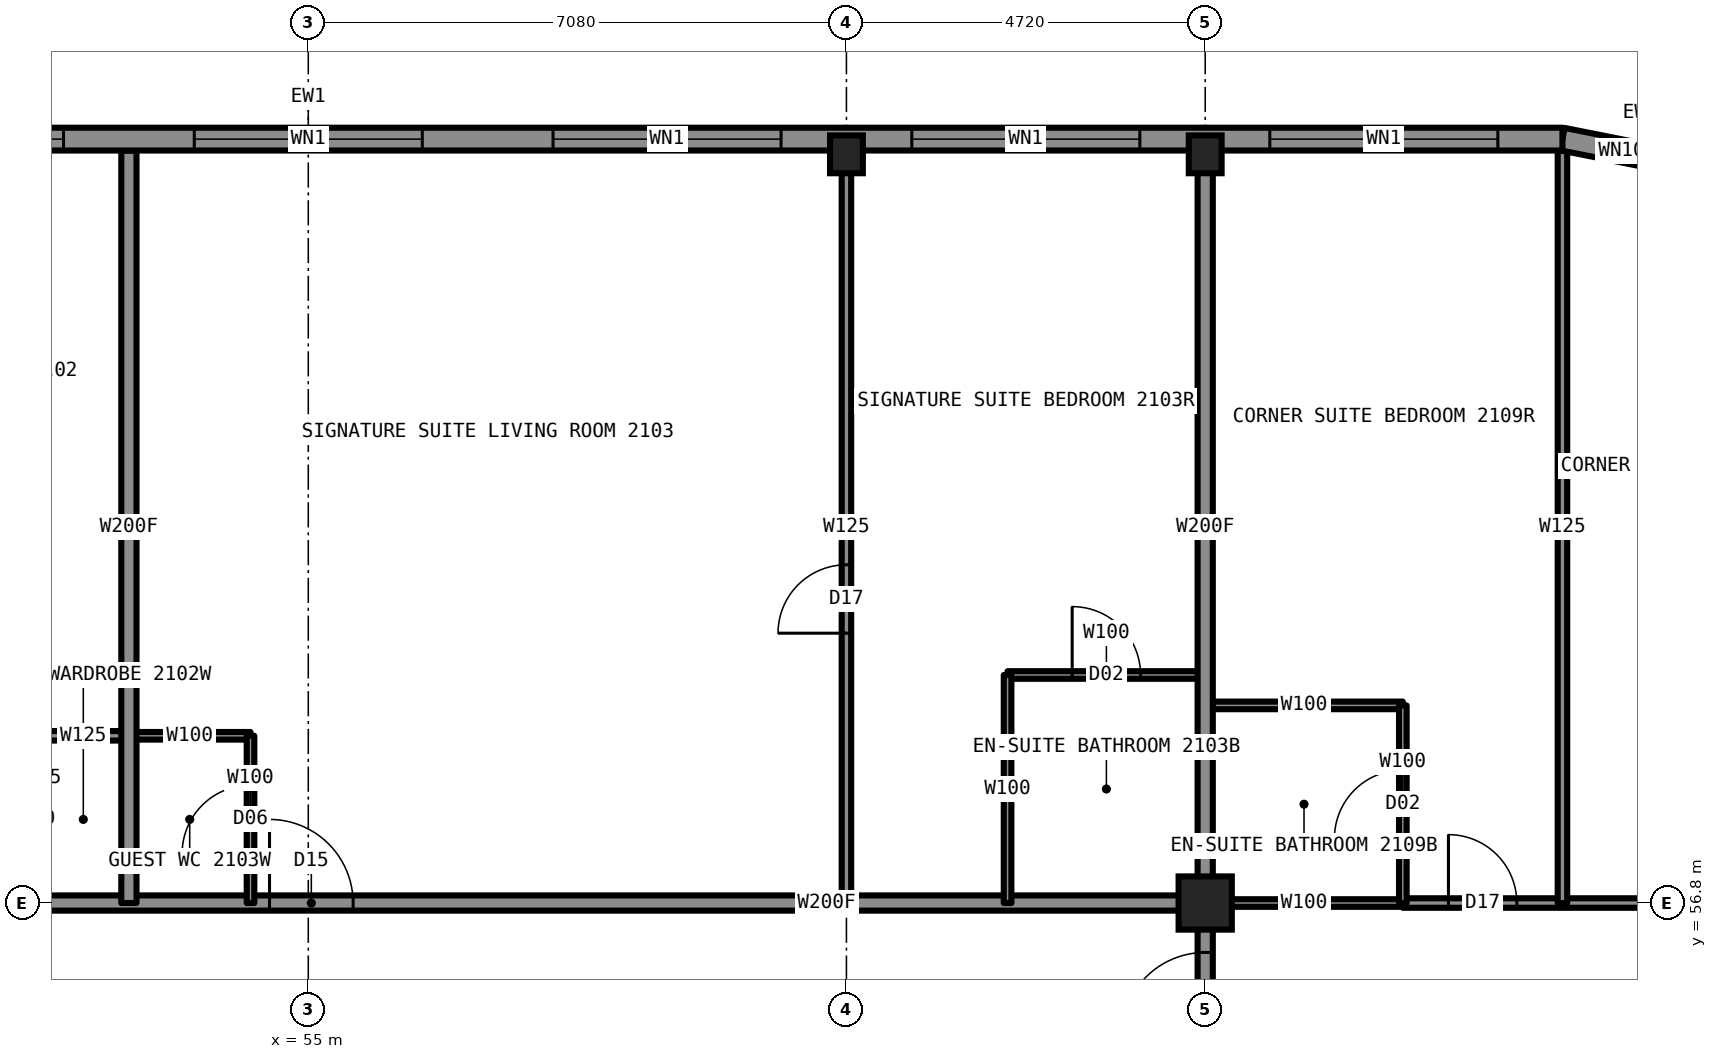
"""IFC4 building model, lengths in metres.
Left out: names, types, materials, properties, quantities, classifications, styles, units other than length and angle.
Written with IfcOpenShell. Run it as: python <this file> out.ifc"""

import sys

from ifc_helpers import new_model, si_unit, direction, frame, frame_2d, origin, origin_2d, place, context, subcontext, project, spatial, rectangle, hollow_rectangle, i_section, extrude, element, fill, save


model = new_model("IFC4")
c1 = context("Model", 3, precision=1e-05, world=origin(), true_north=direction((0.0, 1.0)))
c2 = subcontext(c1, "Body", "Model", "MODEL_VIEW")
j1 = project(units=[si_unit("LENGTHUNIT", "METRE"), si_unit("PLANEANGLEUNIT", "RADIAN")], contexts=[c1])
p1 = place(None, origin())
s1 = spatial("IfcSite", under=j1, at=p1, CompositionType="ELEMENT")
p2 = place(p1, origin())
s2 = spatial("IfcBuilding", under=s1, at=p2, CompositionType="ELEMENT")
p3 = place(p2, frame((0.0, 0.0, 81.0)))
s3 = spatial("IfcBuildingStorey", under=s2, at=p3, CompositionType="ELEMENT", Elevation=81.0)
for number, where, z_axis, x_axis in (
    (1, (62.08, 66.65, 0.0), (0.0, 0.0, 1.0), (1.0, 0.0, 0.0)),
    (2, (66.8, 66.65, 0.0), (0.0, 0.0, 1.0), (1.0, 0.0, 0.0)),
):
    element("IfcColumn", number, at=place(p3, frame(where, z_axis=z_axis, x_axis=x_axis)), inside=s3, PredefinedType="COLUMN", context=c2, shape_type="SweptSolid", body=[
        extrude(i_section(OverallWidth=0.432, OverallDepth=0.498, WebThickness=0.056, FlangeThickness=0.089, at=origin_2d()), origin(), (0.0, 0.0, 1.0), 3.5),
    ])
p4 = place(p3, frame((66.8, 56.8, 0.0), z_axis=(0.0, 0.0, 1.0), x_axis=(1.0, 0.0, 0.0)))
e3 = element("IfcColumn", 3, at=p4, inside=s3, PredefinedType="COLUMN", context=c2, shape_type="SweptSolid", body=[
    extrude(hollow_rectangle(XDim=0.7, YDim=0.7, WallThickness=0.06, at=origin_2d()), origin(), (0.0, 0.0, 1.0), 3.5),
])
p5 = place(p3, frame((66.8, 56.8, 0.0), z_axis=(0.0, 0.0, 1.0), x_axis=(1.0, 0.0, 0.0)))
e4 = element("IfcWall", 4, at=p5, inside=s3, PredefinedType="PARTITIONING", context=c2, shape_type="SweptSolid", body=[
    extrude(rectangle(XDim=2.6, YDim=0.1, at=frame_2d((1.3, 0.0))), origin(), (0.0, 0.0, 1.0), 2.573),
])
p6 = place(p3, frame((43.2, 56.8, 0.0), z_axis=(0.0, 0.0, 1.0), x_axis=(1.0, 0.0, 0.0)))
e5 = element("IfcWall", 5, at=p6, inside=s3, PredefinedType="PARTITIONING", context=c2, shape_type="SweptSolid", body=[
    extrude(rectangle(XDim=23.6, YDim=0.2, at=frame_2d((11.8, 0.0))), origin(), (0.0, 0.0, 1.0), 3.33),
])
p7 = place(p6, frame((0.7, 0.0, 0.0)))
e6 = element("IfcOpeningElement", 6, at=p7, cuts=e5, PredefinedType="OPENING", context=c2, shape_type="SweptSolid", body=[
    extrude(rectangle(XDim=1.0, YDim=2.2, at=frame_2d((0.5, 1.1))), frame((0.0, 0.11, 0.0), z_axis=(0.0, -1.0, 0.0), x_axis=(1.0, 0.0, 0.0)), (0.0, 0.0, 1.0), 0.22),
])
p8 = place(p6, frame((6.98, 0.0, 0.0)))
e7 = element("IfcOpeningElement", 7, at=p8, cuts=e5, PredefinedType="OPENING", context=c2, shape_type="SweptSolid", body=[
    extrude(rectangle(XDim=1.0, YDim=2.2, at=frame_2d((0.5, 1.1))), frame((0.0, 0.11, 0.0), z_axis=(0.0, -1.0, 0.0), x_axis=(1.0, 0.0, 0.0)), (0.0, 0.0, 1.0), 0.22),
])
p9 = place(p6, frame((11.29, 0.0, 0.0)))
e8 = element("IfcOpeningElement", 8, at=p9, cuts=e5, PredefinedType="OPENING", context=c2, shape_type="SweptSolid", body=[
    extrude(rectangle(XDim=1.1, YDim=2.2, at=frame_2d((0.55, 1.1))), frame((0.0, 0.11, 0.0), z_axis=(0.0, -1.0, 0.0), x_axis=(1.0, 0.0, 0.0)), (0.0, 0.0, 1.0), 0.22),
])
p10 = place(p3, frame((69.4, 56.8, 0.0), z_axis=(0.0, 0.0, 1.0), x_axis=(1.0, 0.0, 0.0)))
e9 = element("IfcWall", 9, at=p10, inside=s3, PredefinedType="PARTITIONING", context=c2, shape_type="SweptSolid", body=[
    extrude(rectangle(XDim=7.3, YDim=0.125, at=frame_2d((3.65, 0.0))), origin(), (0.0, 0.0, 1.0), 2.573),
])
p11 = place(p10, frame((0.6, 0.0, 0.0)))
e10 = element("IfcOpeningElement", 10, at=p11, cuts=e9, PredefinedType="OPENING", context=c2, shape_type="SweptSolid", body=[
    extrude(rectangle(XDim=0.9, YDim=2.2, at=frame_2d((0.45, 1.1))), frame((0.0, 0.073, 0.0), z_axis=(0.0, -1.0, 0.0), x_axis=(1.0, 0.0, 0.0)), (0.0, 0.0, 1.0), 0.145),
])
p12 = place(p10, frame((4.4, 0.0, 0.0)))
e11 = element("IfcOpeningElement", 11, at=p12, cuts=e9, PredefinedType="OPENING", context=c2, shape_type="SweptSolid", body=[
    extrude(rectangle(XDim=0.9, YDim=2.2, at=frame_2d((0.45, 1.1))), frame((0.0, 0.073, 0.0), z_axis=(0.0, -1.0, 0.0), x_axis=(1.0, 0.0, 0.0)), (0.0, 0.0, 1.0), 0.145),
])
p13 = place(p3, frame((52.64, 59.0, 0.0), z_axis=(0.0, 0.0, 1.0), x_axis=(1.0, 0.0, 0.0)))
e12 = element("IfcWall", 12, at=p13, inside=s3, PredefinedType="PARTITIONING", context=c2, shape_type="SweptSolid", body=[
    extrude(rectangle(XDim=1.6, YDim=0.1, at=frame_2d((0.8, 0.0))), origin(), (0.0, 0.0, 1.0), 3.33),
])
p14 = place(p3, frame((51.44, 59.0, 0.0), z_axis=(0.0, 0.0, 1.0), x_axis=(1.0, 0.0, 0.0)))
e13 = element("IfcWall", 13, at=p14, inside=s3, PredefinedType="PARTITIONING", context=c2, shape_type="SweptSolid", body=[
    extrude(rectangle(XDim=1.2, YDim=0.125, at=frame_2d((0.6, 0.0))), origin(), (0.0, 0.0, 1.0), 3.33),
])
p15 = place(p3, frame((66.8, 59.4, 0.0), z_axis=(0.0, 0.0, 1.0), x_axis=(1.0, 0.0, 0.0)))
e14 = element("IfcWall", 14, at=p15, inside=s3, PredefinedType="PARTITIONING", context=c2, shape_type="SweptSolid", body=[
    extrude(rectangle(XDim=2.6, YDim=0.1, at=frame_2d((1.3, 0.0))), origin(), (0.0, 0.0, 1.0), 3.33),
])
p16 = place(p3, frame((64.2, 59.8, 0.0), z_axis=(0.0, 0.0, 1.0), x_axis=(1.0, 0.0, 0.0)))
e15 = element("IfcWall", 15, at=p16, inside=s3, PredefinedType="PARTITIONING", context=c2, shape_type="SweptSolid", body=[
    extrude(rectangle(XDim=2.6, YDim=0.1, at=frame_2d((1.3, 0.0))), origin(), (0.0, 0.0, 1.0), 3.33),
])
p17 = place(p16, frame((0.85, 0.0, 0.0)))
e16 = element("IfcOpeningElement", 16, at=p17, cuts=e15, PredefinedType="OPENING", context=c2, shape_type="SweptSolid", body=[
    extrude(rectangle(XDim=0.9, YDim=2.1, at=frame_2d((0.45, 1.05))), frame((0.0, 0.06, 0.0), z_axis=(0.0, -1.0, 0.0), x_axis=(1.0, 0.0, 0.0)), (0.0, 0.0, 1.0), 0.12),
])
p18 = place(p3, frame((54.24, 56.8, 0.0), z_axis=(0.0, 0.0, 1.0), x_axis=(0.0, 1.0, 0.0)))
e17 = element("IfcWall", 17, at=p18, inside=s3, PredefinedType="PARTITIONING", context=c2, shape_type="SweptSolid", body=[
    extrude(rectangle(XDim=2.2, YDim=0.1, at=frame_2d((1.1, 0.0))), origin(), (0.0, 0.0, 1.0), 3.33),
])
p19 = place(p18, frame((0.65, 0.0, 0.0)))
e18 = element("IfcOpeningElement", 18, at=p19, cuts=e17, PredefinedType="OPENING", context=c2, shape_type="SweptSolid", body=[
    extrude(rectangle(XDim=0.9, YDim=2.1, at=frame_2d((0.45, 1.05))), frame((0.0, 0.06, 0.0), z_axis=(0.0, -1.0, 0.0), x_axis=(1.0, 0.0, 0.0)), (0.0, 0.0, 1.0), 0.12),
])
p20 = place(p3, frame((52.64, 56.8, 0.0), z_axis=(0.0, 0.0, 1.0), x_axis=(0.0, 1.0, 0.0)))
e19 = element("IfcWall", 19, at=p20, inside=s3, PredefinedType="PARTITIONING", context=c2, shape_type="SweptSolid", body=[
    extrude(rectangle(XDim=9.9, YDim=0.2, at=frame_2d((4.95, 0.0))), origin(), (0.0, 0.0, 1.0), 3.33),
])
p21 = place(p3, frame((66.8, 33.2, 0.0), z_axis=(0.0, 0.0, 1.0), x_axis=(0.0, 1.0, 0.0)))
e20 = element("IfcWall", 20, at=p21, inside=s3, PredefinedType="PARTITIONING", context=c2, shape_type="SweptSolid", body=[
    extrude(rectangle(XDim=23.6, YDim=0.2, at=frame_2d((11.8, 0.0))), origin(), (0.0, 0.0, 1.0), 3.33),
])
p22 = place(p21, frame((7.72, 0.0, 0.0)))
e21 = element("IfcOpeningElement", 21, at=p22, cuts=e20, PredefinedType="OPENING", context=c2, shape_type="SweptSolid", body=[
    extrude(rectangle(XDim=1.0, YDim=2.2, at=frame_2d((0.5, 1.1))), frame((0.0, 0.11, 0.0), z_axis=(0.0, -1.0, 0.0), x_axis=(1.0, 0.0, 0.0)), (0.0, 0.0, 1.0), 0.22),
])
p23 = place(p21, frame((16.42, 0.0, 0.0)))
e22 = element("IfcOpeningElement", 22, at=p23, cuts=e20, PredefinedType="OPENING", context=c2, shape_type="SweptSolid", body=[
    extrude(rectangle(XDim=1.0, YDim=2.2, at=frame_2d((0.5, 1.1))), frame((0.0, 0.11, 0.0), z_axis=(0.0, -1.0, 0.0), x_axis=(1.0, 0.0, 0.0)), (0.0, 0.0, 1.0), 0.22),
])
p24 = place(p21, frame((21.85, 0.0, 0.0)))
e23 = element("IfcOpeningElement", 23, at=p24, cuts=e20, PredefinedType="OPENING", context=c2, shape_type="SweptSolid", body=[
    extrude(rectangle(XDim=1.1, YDim=2.2, at=frame_2d((0.55, 1.1))), frame((0.0, 0.11, 0.0), z_axis=(0.0, -1.0, 0.0), x_axis=(1.0, 0.0, 0.0)), (0.0, 0.0, 1.0), 0.22),
])
p25 = place(p21, frame((0.66, 0.0, 0.0)))
e24 = element("IfcOpeningElement", 24, at=p25, cuts=e20, PredefinedType="OPENING", context=c2, shape_type="SweptSolid", body=[
    extrude(rectangle(XDim=1.1, YDim=2.2, at=frame_2d((0.55, 1.1))), frame((0.0, 0.11, 0.0), z_axis=(0.0, -1.0, 0.0), x_axis=(1.0, 0.0, 0.0)), (0.0, 0.0, 1.0), 0.22),
])
p26 = place(p3, frame((66.8, 56.8, 0.0), z_axis=(0.0, 0.0, 1.0), x_axis=(0.0, 1.0, 0.0)))
e25 = element("IfcWall", 25, at=p26, inside=s3, PredefinedType="PARTITIONING", context=c2, shape_type="SweptSolid", body=[
    extrude(rectangle(XDim=9.9, YDim=0.2, at=frame_2d((4.95, 0.0))), origin(), (0.0, 0.0, 1.0), 2.573),
])
p27 = place(p3, frame((69.4, 56.8, 0.0), z_axis=(0.0, 0.0, 1.0), x_axis=(0.0, 1.0, 0.0)))
e26 = element("IfcWall", 26, at=p27, inside=s3, PredefinedType="PARTITIONING", context=c2, shape_type="SweptSolid", body=[
    extrude(rectangle(XDim=2.6, YDim=0.1, at=frame_2d((1.3, 0.0))), origin(), (0.0, 0.0, 1.0), 3.33),
])
p28 = place(p27, frame((0.85, 0.0, 0.0)))
e27 = element("IfcOpeningElement", 27, at=p28, cuts=e26, PredefinedType="OPENING", context=c2, shape_type="SweptSolid", body=[
    extrude(rectangle(XDim=0.9, YDim=2.1, at=frame_2d((0.45, 1.05))), frame((0.0, 0.06, 0.0), z_axis=(0.0, -1.0, 0.0), x_axis=(1.0, 0.0, 0.0)), (0.0, 0.0, 1.0), 0.12),
])
p29 = place(p3, frame((71.5, 56.8, 0.0), z_axis=(0.0, 0.0, 1.0), x_axis=(0.0, 1.0, 0.0)))
e28 = element("IfcWall", 28, at=p29, inside=s3, PredefinedType="PARTITIONING", context=c2, shape_type="SweptSolid", body=[
    extrude(rectangle(XDim=9.894, YDim=0.125, at=frame_2d((4.947, 0.0))), origin(), (0.0, 0.0, 1.0), 3.33),
])
p30 = place(p3, frame((62.08, 56.8, 0.0), z_axis=(0.0, 0.0, 1.0), x_axis=(0.0, 1.0, 0.0)))
e29 = element("IfcWall", 29, at=p30, inside=s3, PredefinedType="PARTITIONING", context=c2, shape_type="SweptSolid", body=[
    extrude(rectangle(XDim=9.9, YDim=0.125, at=frame_2d((4.95, 0.0))), origin(), (0.0, 0.0, 1.0), 2.573),
])
p31 = place(p30, frame((3.55, 0.0, 0.0)))
e30 = element("IfcOpeningElement", 30, at=p31, cuts=e29, PredefinedType="OPENING", context=c2, shape_type="SweptSolid", body=[
    extrude(rectangle(XDim=0.9, YDim=2.2, at=frame_2d((0.45, 1.1))), frame((0.0, 0.073, 0.0), z_axis=(0.0, -1.0, 0.0), x_axis=(1.0, 0.0, 0.0)), (0.0, 0.0, 1.0), 0.145),
])
p32 = place(p3, frame((64.2, 56.8, 0.0), z_axis=(0.0, 0.0, 1.0), x_axis=(0.0, 1.0, 0.0)))
e31 = element("IfcWall", 31, at=p32, inside=s3, PredefinedType="PARTITIONING", context=c2, shape_type="SweptSolid", body=[
    extrude(rectangle(XDim=3.0, YDim=0.1, at=frame_2d((1.5, 0.0))), origin(), (0.0, 0.0, 1.0), 3.33),
])
p33 = place(p3, frame((73.547, 66.443, 0.0), z_axis=(0.0, 0.0, 1.0), x_axis=(-0.980787050784, 0.195081421501, 0.0)))
e32 = element("IfcWall", 32, at=p33, inside=s3, PredefinedType="SOLIDWALL", context=c2, shape_type="SweptSolid", body=[
    extrude(rectangle(XDim=2.087, YDim=0.3, at=frame_2d((1.044, 0.0))), origin(), (0.0, 0.0, 1.0), 3.33),
])
p34 = place(p33, frame((0.994, 0.0, 1.65)))
e33 = element("IfcOpeningElement", 33, at=p34, cuts=e32, PredefinedType="OPENING", context=c2, shape_type="SweptSolid", body=[
    extrude(rectangle(XDim=0.6, YDim=0.8, at=frame_2d((0.3, 0.4))), frame((0.0, 0.16, 0.0), z_axis=(0.0, -1.0, 0.0), x_axis=(1.0, 0.0, 0.0)), (0.0, 0.0, 1.0), 0.32),
])
p35 = place(p3, frame((71.5, 66.85, 0.0), z_axis=(0.0, 0.0, 1.0), x_axis=(-1.0, 0.0, 0.0)))
e34 = element("IfcWall", 34, at=p35, inside=s3, PredefinedType="SOLIDWALL", context=c2, shape_type="SweptSolid", body=[
    extrude(rectangle(XDim=33.0, YDim=0.3, at=frame_2d((16.5, 0.0))), origin(), (0.0, 0.0, 1.0), 2.63),
])
p36 = place(p35, frame((0.85, 0.0, 0.5)))
e35 = element("IfcOpeningElement", 35, at=p36, cuts=e34, PredefinedType="OPENING", context=c2, shape_type="SweptSolid", body=[
    extrude(rectangle(XDim=3.0, YDim=2.0, at=frame_2d((1.5, 1.0))), frame((0.0, 0.16, 0.0), z_axis=(0.0, -1.0, 0.0), x_axis=(1.0, 0.0, 0.0)), (0.0, 0.0, 1.0), 0.32),
])
p37 = place(p35, frame((5.56, 0.0, 0.5)))
e36 = element("IfcOpeningElement", 36, at=p37, cuts=e34, PredefinedType="OPENING", context=c2, shape_type="SweptSolid", body=[
    extrude(rectangle(XDim=3.0, YDim=2.0, at=frame_2d((1.5, 1.0))), frame((0.0, 0.16, 0.0), z_axis=(0.0, -1.0, 0.0), x_axis=(1.0, 0.0, 0.0)), (0.0, 0.0, 1.0), 0.32),
])
p38 = place(p35, frame((10.28, 0.0, 0.5)))
e37 = element("IfcOpeningElement", 37, at=p38, cuts=e34, PredefinedType="OPENING", context=c2, shape_type="SweptSolid", body=[
    extrude(rectangle(XDim=3.0, YDim=2.0, at=frame_2d((1.5, 1.0))), frame((0.0, 0.16, 0.0), z_axis=(0.0, -1.0, 0.0), x_axis=(1.0, 0.0, 0.0)), (0.0, 0.0, 1.0), 0.32),
])
p39 = place(p35, frame((15.0, 0.0, 0.5)))
e38 = element("IfcOpeningElement", 38, at=p39, cuts=e34, PredefinedType="OPENING", context=c2, shape_type="SweptSolid", body=[
    extrude(rectangle(XDim=3.0, YDim=2.0, at=frame_2d((1.5, 1.0))), frame((0.0, 0.16, 0.0), z_axis=(0.0, -1.0, 0.0), x_axis=(1.0, 0.0, 0.0)), (0.0, 0.0, 1.0), 0.32),
])
p40 = place(p35, frame((19.72, 0.0, 0.5)))
e39 = element("IfcOpeningElement", 39, at=p40, cuts=e34, PredefinedType="OPENING", context=c2, shape_type="SweptSolid", body=[
    extrude(rectangle(XDim=3.0, YDim=2.0, at=frame_2d((1.5, 1.0))), frame((0.0, 0.16, 0.0), z_axis=(0.0, -1.0, 0.0), x_axis=(1.0, 0.0, 0.0)), (0.0, 0.0, 1.0), 0.32),
])
p41 = place(p35, frame((24.44, 0.0, 0.5)))
e40 = element("IfcOpeningElement", 40, at=p41, cuts=e34, PredefinedType="OPENING", context=c2, shape_type="SweptSolid", body=[
    extrude(rectangle(XDim=3.0, YDim=2.0, at=frame_2d((1.5, 1.0))), frame((0.0, 0.16, 0.0), z_axis=(0.0, -1.0, 0.0), x_axis=(1.0, 0.0, 0.0)), (0.0, 0.0, 1.0), 0.32),
])
p42 = place(p35, frame((29.15, 0.0, 0.5)))
e41 = element("IfcOpeningElement", 41, at=p42, cuts=e34, PredefinedType="OPENING", context=c2, shape_type="SweptSolid", body=[
    extrude(rectangle(XDim=3.0, YDim=2.0, at=frame_2d((1.5, 1.0))), frame((0.0, 0.16, 0.0), z_axis=(0.0, -1.0, 0.0), x_axis=(1.0, 0.0, 0.0)), (0.0, 0.0, 1.0), 0.32),
])
p43 = place(p9, origin())
e42 = element("IfcDoor", 42, at=p43, inside=s3, OperationType="SINGLE_SWING_LEFT", PredefinedType="DOOR", context=c2, shape_type="SweptSolid", body=[
    extrude(rectangle(XDim=1.1, YDim=2.2, at=frame_2d((0.55, 1.1))), frame((0.0, 0.025, 0.0), z_axis=(0.0, -1.0, 0.0), x_axis=(1.0, 0.0, 0.0)), (0.0, 0.0, 1.0), 0.05),
])
fill(e8, e42)
p44 = place(p17, origin())
e43 = element("IfcDoor", 43, at=p44, inside=s3, OperationType="SINGLE_SWING_RIGHT", PredefinedType="DOOR", context=c2, shape_type="SweptSolid", body=[
    extrude(rectangle(XDim=0.9, YDim=2.1, at=frame_2d((0.45, 1.05))), frame((0.0, 0.025, 0.0), z_axis=(0.0, -1.0, 0.0), x_axis=(1.0, 0.0, 0.0)), (0.0, 0.0, 1.0), 0.05),
])
fill(e16, e43)
p45 = place(p31, origin())
e44 = element("IfcDoor", 44, at=p45, inside=s3, OperationType="SINGLE_SWING_LEFT", PredefinedType="DOOR", context=c2, shape_type="SweptSolid", body=[
    extrude(rectangle(XDim=0.9, YDim=2.2, at=frame_2d((0.45, 1.1))), frame((0.0, 0.025, 0.0), z_axis=(0.0, -1.0, 0.0), x_axis=(1.0, 0.0, 0.0)), (0.0, 0.0, 1.0), 0.05),
])
fill(e30, e44)
p46 = place(p19, origin())
e45 = element("IfcDoor", 45, at=p46, inside=s3, OperationType="SINGLE_SWING_LEFT", PredefinedType="DOOR", context=c2, shape_type="SweptSolid", body=[
    extrude(rectangle(XDim=0.9, YDim=2.1, at=frame_2d((0.45, 1.05))), frame((0.0, 0.025, 0.0), z_axis=(0.0, -1.0, 0.0), x_axis=(1.0, 0.0, 0.0)), (0.0, 0.0, 1.0), 0.05),
])
fill(e18, e45)
p47 = place(p24, origin())
e46 = element("IfcDoor", 46, at=p47, inside=s3, OperationType="SINGLE_SWING_LEFT", PredefinedType="DOOR", context=c2, shape_type="SweptSolid", body=[
    extrude(rectangle(XDim=1.1, YDim=2.2, at=frame_2d((0.55, 1.1))), frame((0.0, 0.025, 0.0), z_axis=(0.0, -1.0, 0.0), x_axis=(1.0, 0.0, 0.0)), (0.0, 0.0, 1.0), 0.05),
])
fill(e23, e46)
p48 = place(p28, origin())
e47 = element("IfcDoor", 47, at=p48, inside=s3, OperationType="SINGLE_SWING_RIGHT", PredefinedType="DOOR", context=c2, shape_type="SweptSolid", body=[
    extrude(rectangle(XDim=0.9, YDim=2.1, at=frame_2d((0.45, 1.05))), frame((0.0, 0.025, 0.0), z_axis=(0.0, -1.0, 0.0), x_axis=(1.0, 0.0, 0.0)), (0.0, 0.0, 1.0), 0.05),
])
fill(e27, e47)
p49 = place(p11, origin())
e48 = element("IfcDoor", 48, at=p49, inside=s3, OperationType="SINGLE_SWING_LEFT", PredefinedType="DOOR", context=c2, shape_type="SweptSolid", body=[
    extrude(rectangle(XDim=0.9, YDim=2.2, at=frame_2d((0.45, 1.1))), frame((0.0, 0.025, 0.0), z_axis=(0.0, -1.0, 0.0), x_axis=(1.0, 0.0, 0.0)), (0.0, 0.0, 1.0), 0.05),
])
fill(e10, e48)
p50 = place(p34, origin())
e49 = element("IfcWindow", 49, at=p50, inside=s3, PartitioningType="SINGLE_PANEL", PredefinedType="WINDOW", context=c2, shape_type="SweptSolid", body=[
    extrude(rectangle(XDim=0.6, YDim=0.8, at=frame_2d((0.3, 0.4))), frame((0.0, 0.03, 0.0), z_axis=(0.0, -1.0, 0.0), x_axis=(1.0, 0.0, 0.0)), (0.0, 0.0, 1.0), 0.06),
])
fill(e33, e49)
p51 = place(p36, origin())
e50 = element("IfcWindow", 50, at=p51, inside=s3, PartitioningType="SINGLE_PANEL", PredefinedType="WINDOW", context=c2, shape_type="SweptSolid", body=[
    extrude(rectangle(XDim=3.0, YDim=2.0, at=frame_2d((1.5, 1.0))), frame((0.0, 0.03, 0.0), z_axis=(0.0, -1.0, 0.0), x_axis=(1.0, 0.0, 0.0)), (0.0, 0.0, 1.0), 0.06),
])
fill(e35, e50)
p52 = place(p37, origin())
e51 = element("IfcWindow", 51, at=p52, inside=s3, PartitioningType="SINGLE_PANEL", PredefinedType="WINDOW", context=c2, shape_type="SweptSolid", body=[
    extrude(rectangle(XDim=3.0, YDim=2.0, at=frame_2d((1.5, 1.0))), frame((0.0, 0.03, 0.0), z_axis=(0.0, -1.0, 0.0), x_axis=(1.0, 0.0, 0.0)), (0.0, 0.0, 1.0), 0.06),
])
fill(e36, e51)
p53 = place(p38, origin())
e52 = element("IfcWindow", 52, at=p53, inside=s3, PartitioningType="SINGLE_PANEL", PredefinedType="WINDOW", context=c2, shape_type="SweptSolid", body=[
    extrude(rectangle(XDim=3.0, YDim=2.0, at=frame_2d((1.5, 1.0))), frame((0.0, 0.03, 0.0), z_axis=(0.0, -1.0, 0.0), x_axis=(1.0, 0.0, 0.0)), (0.0, 0.0, 1.0), 0.06),
])
fill(e37, e52)
p54 = place(p39, origin())
e53 = element("IfcWindow", 53, at=p54, inside=s3, PartitioningType="SINGLE_PANEL", PredefinedType="WINDOW", context=c2, shape_type="SweptSolid", body=[
    extrude(rectangle(XDim=3.0, YDim=2.0, at=frame_2d((1.5, 1.0))), frame((0.0, 0.03, 0.0), z_axis=(0.0, -1.0, 0.0), x_axis=(1.0, 0.0, 0.0)), (0.0, 0.0, 1.0), 0.06),
])
fill(e38, e53)
p55 = place(p40, origin())
e54 = element("IfcWindow", 54, at=p55, inside=s3, PartitioningType="SINGLE_PANEL", PredefinedType="WINDOW", context=c2, shape_type="SweptSolid", body=[
    extrude(rectangle(XDim=3.0, YDim=2.0, at=frame_2d((1.5, 1.0))), frame((0.0, 0.03, 0.0), z_axis=(0.0, -1.0, 0.0), x_axis=(1.0, 0.0, 0.0)), (0.0, 0.0, 1.0), 0.06),
])
fill(e39, e54)
save(model, sys.argv[1])
